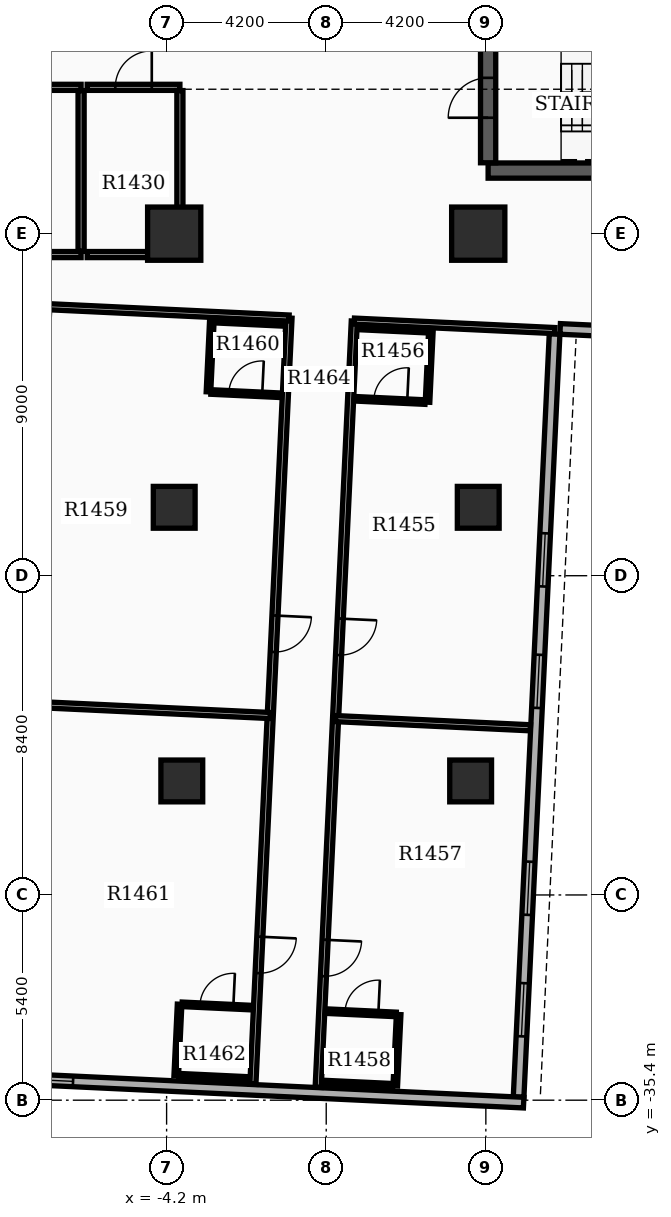
"""IFC4 building model, lengths in metres.
Left out: names, types, materials, properties, quantities, classifications, styles, units other than length and angle.
Written with IfcOpenShell. Run it as: python <this file> out.ifc"""

import sys

from ifc_helpers import new_model, si_unit, direction, frame, frame_2d, origin, origin_2d, place, context, subcontext, project, spatial, rectangle, extrude, element, fill, save


model = new_model("IFC4")
c1 = context("Model", 3, precision=1e-05, world=origin(), true_north=direction((0.0, 1.0)))
c2 = subcontext(c1, "Body", "Model", "MODEL_VIEW")
j1 = project(units=[si_unit("LENGTHUNIT", "METRE"), si_unit("PLANEANGLEUNIT", "RADIAN")], contexts=[c1])
p1 = place(None, origin())
s1 = spatial("IfcSite", under=j1, at=p1, CompositionType="ELEMENT")
p2 = place(p1, origin())
s2 = spatial("IfcBuilding", under=s1, at=p2, CompositionType="ELEMENT")
p3 = place(p2, frame((0.0, 0.0, 91.2)))
s3 = spatial("IfcBuildingStorey", under=s2, at=p3, CompositionType="ELEMENT", Elevation=91.2)
p4 = place(p3, frame((4.26, -10.94, 0.0), z_axis=(0.0, 0.0, 1.0), x_axis=(1.0, 0.0, 0.0)))
e1 = element("IfcWall", 1, at=p4, inside=s3, PredefinedType="SHEAR", context=c2, shape_type="SweptSolid", body=[
    extrude(rectangle(XDim=7.96, YDim=0.4, at=frame_2d((3.98, 0.0))), origin(), (0.0, 0.0, 1.0), 3.65),
])
p5 = place(p3, frame((4.26, -10.735, 0.0), z_axis=(0.0, 0.0, 1.0), x_axis=(0.0, 1.0, 0.0)))
e2 = element("IfcWall", 2, at=p5, inside=s3, PredefinedType="SHEAR", context=c2, shape_type="SweptSolid", body=[
    extrude(rectangle(XDim=3.43, YDim=0.4, at=frame_2d((1.715, 0.0))), origin(), (0.0, 0.0, 1.0), 3.65),
])
p6 = place(p5, frame((1.185, 0.0, 0.0)))
e3 = element("IfcOpeningElement", 3, at=p6, cuts=e2, PredefinedType="OPENING", context=c2, shape_type="SweptSolid", body=[
    extrude(rectangle(XDim=1.05, YDim=2.15, at=frame_2d((0.525, 1.075))), frame((0.0, 0.21, 0.0), z_axis=(0.0, -1.0, 0.0), x_axis=(1.0, 0.0, 0.0)), (0.0, 0.0, 1.0), 0.42),
])
for number, where, z_axis, x_axis in (
    (4, (-4.0, -12.6, 0.0), (0.0, 0.0, 1.0), (1.0, 0.0, 0.0)),
    (5, (4.0, -12.6, 0.0), (0.0, 0.0, 1.0), (1.0, 0.0, 0.0)),
):
    element("IfcColumn", number, at=place(p3, frame(where, z_axis=z_axis, x_axis=x_axis)), inside=s3, PredefinedType="COLUMN", context=c2, shape_type="SweptSolid", body=[
        extrude(rectangle(XDim=1.4, YDim=1.4, at=origin_2d()), origin(), (0.0, 0.0, 1.0), 3.9),
    ])
for number, where, z_axis, x_axis in (
    (6, (-4.0, -19.8, 0.0), (0.0, 0.0, 1.0), (1.0, 0.0, 0.0)),
    (7, (4.0, -19.8, 0.0), (0.0, 0.0, 1.0), (1.0, 0.0, 0.0)),
    (8, (-3.8, -27.0, 0.0), (0.0, 0.0, 1.0), (1.0, 0.0, 0.0)),
    (9, (3.8, -27.0, 0.0), (0.0, 0.0, 1.0), (1.0, 0.0, 0.0)),
):
    element("IfcColumn", number, at=place(p3, frame(where, z_axis=z_axis, x_axis=x_axis)), inside=s3, PredefinedType="COLUMN", context=c2, shape_type="SweptSolid", body=[
        extrude(rectangle(XDim=1.1, YDim=1.1, at=origin_2d()), origin(), (0.0, 0.0, 1.0), 3.9),
    ])
p7 = place(p3, frame((5.062, -35.318, 0.0), z_axis=(0.0, 0.0, 1.0), x_axis=(0.047103473814, 0.998890015344, 0.0)))
e10 = element("IfcWall", 10, at=p7, inside=s3, PredefinedType="STANDARD", context=c2, shape_type="SweptSolid", body=[
    extrude(rectangle(XDim=20.1, YDim=0.28, at=frame_2d((10.05, 0.0))), origin(), (0.0, 0.0, 1.0), 2.86),
])
p8 = place(p7, frame((1.6, 0.0, 0.8)))
e11 = element("IfcOpeningElement", 11, at=p8, cuts=e10, PredefinedType="OPENING", context=c2, shape_type="SweptSolid", body=[
    extrude(rectangle(XDim=1.4, YDim=1.6, at=frame_2d((0.7, 0.8))), frame((0.0, 0.15, 0.0), z_axis=(0.0, -1.0, 0.0), x_axis=(1.0, 0.0, 0.0)), (0.0, 0.0, 1.0), 0.3),
])
p9 = place(p7, frame((4.8, 0.0, 0.8)))
e12 = element("IfcOpeningElement", 12, at=p9, cuts=e10, PredefinedType="OPENING", context=c2, shape_type="SweptSolid", body=[
    extrude(rectangle(XDim=1.4, YDim=1.6, at=frame_2d((0.7, 0.8))), frame((0.0, 0.15, 0.0), z_axis=(0.0, -1.0, 0.0), x_axis=(1.0, 0.0, 0.0)), (0.0, 0.0, 1.0), 0.3),
])
p10 = place(p7, frame((10.25, 0.0, 0.8)))
e13 = element("IfcOpeningElement", 13, at=p10, cuts=e10, PredefinedType="OPENING", context=c2, shape_type="SweptSolid", body=[
    extrude(rectangle(XDim=1.4, YDim=1.6, at=frame_2d((0.7, 0.8))), frame((0.0, 0.15, 0.0), z_axis=(0.0, -1.0, 0.0), x_axis=(1.0, 0.0, 0.0)), (0.0, 0.0, 1.0), 0.3),
])
p11 = place(p7, frame((13.45, 0.0, 0.8)))
e14 = element("IfcOpeningElement", 14, at=p11, cuts=e10, PredefinedType="OPENING", context=c2, shape_type="SweptSolid", body=[
    extrude(rectangle(XDim=1.4, YDim=1.6, at=frame_2d((0.7, 0.8))), frame((0.0, 0.15, 0.0), z_axis=(0.0, -1.0, 0.0), x_axis=(1.0, 0.0, 0.0)), (0.0, 0.0, 1.0), 0.3),
])
p12 = place(p3, frame((-8.51, -34.818, 0.0), z_axis=(0.0, 0.0, 1.0), x_axis=(0.998890092147, -0.047101845086, 0.0)))
e15 = element("IfcWall", 15, at=p12, inside=s3, PredefinedType="STANDARD", context=c2, shape_type="SweptSolid", body=[
    extrude(rectangle(XDim=13.72, YDim=0.28, at=frame_2d((6.86, 0.0))), origin(), (0.0, 0.0, 1.0), 2.86),
])
p13 = place(p12, frame((0.85, 0.0, 0.85)))
e16 = element("IfcOpeningElement", 16, at=p13, cuts=e15, PredefinedType="OPENING", context=c2, shape_type="SweptSolid", body=[
    extrude(rectangle(XDim=1.0, YDim=1.5, at=frame_2d((0.5, 0.75))), frame((0.0, 0.15, 0.0), z_axis=(0.0, -1.0, 0.0), x_axis=(1.0, 0.0, 0.0)), (0.0, 0.0, 1.0), 0.3),
])
p14 = place(p3, frame((12.448, -15.404, 0.0), z_axis=(0.0, 0.0, 1.0), x_axis=(-0.998889082162, 0.047123258997, 0.0)))
e17 = element("IfcWall", 17, at=p14, inside=s3, PredefinedType="STANDARD", context=c2, shape_type="SweptSolid", body=[
    extrude(rectangle(XDim=6.3, YDim=0.28, at=frame_2d((3.15, 0.0))), origin(), (0.0, 0.0, 1.0), 2.86),
])
p15 = place(p3, frame((-12.4, -13.15, 0.0), z_axis=(0.0, 0.0, 1.0), x_axis=(1.0, 0.0, 0.0)))
e18 = element("IfcWall", 18, at=p15, inside=s3, PredefinedType="PARTITIONING", context=c2, shape_type="SweptSolid", body=[
    extrude(rectangle(XDim=5.95, YDim=0.16, at=frame_2d((2.975, 0.0))), origin(), (0.0, 0.0, 1.0), 2.85),
])
p16 = place(p3, frame((-12.4, -8.75, 0.0), z_axis=(0.0, 0.0, 1.0), x_axis=(1.0, 0.0, 0.0)))
e19 = element("IfcWall", 19, at=p16, inside=s3, PredefinedType="PARTITIONING", context=c2, shape_type="SweptSolid", body=[
    extrude(rectangle(XDim=5.95, YDim=0.16, at=frame_2d((2.975, 0.0))), origin(), (0.0, 0.0, 1.0), 2.85),
])
p17 = place(p16, frame((2.495, 0.0, 0.0)))
e20 = element("IfcOpeningElement", 20, at=p17, cuts=e19, PredefinedType="OPENING", context=c2, shape_type="SweptSolid", body=[
    extrude(rectangle(XDim=0.96, YDim=2.15, at=frame_2d((0.48, 1.075))), frame((0.0, 0.09, 0.0), z_axis=(0.0, -1.0, 0.0), x_axis=(1.0, 0.0, 0.0)), (0.0, 0.0, 1.0), 0.18),
])
p18 = place(p3, frame((-6.45, -13.065, 0.0), z_axis=(0.0, 0.0, 1.0), x_axis=(0.0, 1.0, 0.0)))
e21 = element("IfcWall", 21, at=p18, inside=s3, PredefinedType="PARTITIONING", context=c2, shape_type="SweptSolid", body=[
    extrude(rectangle(XDim=4.23, YDim=0.16, at=frame_2d((2.115, 0.0))), origin(), (0.0, 0.0, 1.0), 2.85),
])
p19 = place(p3, frame((-6.29, -13.15, 0.0), z_axis=(0.0, 0.0, 1.0), x_axis=(1.0, 0.0, 0.0)))
e22 = element("IfcWall", 22, at=p19, inside=s3, PredefinedType="PARTITIONING", context=c2, shape_type="SweptSolid", body=[
    extrude(rectangle(XDim=2.44, YDim=0.16, at=frame_2d((1.22, 0.0))), origin(), (0.0, 0.0, 1.0), 2.85),
])
p20 = place(p3, frame((-6.29, -8.75, 0.0), z_axis=(0.0, 0.0, 1.0), x_axis=(1.0, 0.0, 0.0)))
e23 = element("IfcWall", 23, at=p20, inside=s3, PredefinedType="PARTITIONING", context=c2, shape_type="SweptSolid", body=[
    extrude(rectangle(XDim=2.44, YDim=0.16, at=frame_2d((1.22, 0.0))), origin(), (0.0, 0.0, 1.0), 2.85),
])
p21 = place(p20, frame((0.74, 0.0, 0.0)))
e24 = element("IfcOpeningElement", 24, at=p21, cuts=e23, PredefinedType="OPENING", context=c2, shape_type="SweptSolid", body=[
    extrude(rectangle(XDim=0.96, YDim=2.15, at=frame_2d((0.48, 1.075))), frame((0.0, 0.09, 0.0), z_axis=(0.0, -1.0, 0.0), x_axis=(1.0, 0.0, 0.0)), (0.0, 0.0, 1.0), 0.18),
])
p22 = place(p3, frame((-3.85, -13.065, 0.0), z_axis=(0.0, 0.0, 1.0), x_axis=(0.0, 1.0, 0.0)))
e25 = element("IfcWall", 25, at=p22, inside=s3, PredefinedType="PARTITIONING", context=c2, shape_type="SweptSolid", body=[
    extrude(rectangle(XDim=4.23, YDim=0.16, at=frame_2d((2.115, 0.0))), origin(), (0.0, 0.0, 1.0), 2.85),
])
p23 = place(p3, frame((0.739, -14.901, 0.0), z_axis=(0.0, 0.0, 1.0), x_axis=(-0.047117991871, -0.998889330628, 0.0)))
e26 = element("IfcWall", 26, at=p23, inside=s3, PredefinedType="PARTITIONING", context=c2, shape_type="SweptSolid", body=[
    extrude(rectangle(XDim=20.182, YDim=0.16, at=frame_2d((10.091, 0.0))), origin(), (0.0, 0.0, 1.0), 2.85),
])
p24 = place(p23, frame((7.836, 0.0, 0.0)))
e27 = element("IfcOpeningElement", 27, at=p24, cuts=e26, PredefinedType="OPENING", context=c2, shape_type="SweptSolid", body=[
    extrude(rectangle(XDim=0.96, YDim=2.15, at=frame_2d((0.48, 1.075))), frame((0.0, 0.09, 0.0), z_axis=(0.0, -1.0, 0.0), x_axis=(1.0, 0.0, 0.0)), (0.0, 0.0, 1.0), 0.18),
])
p25 = place(p23, frame((16.296, 0.0, 0.0)))
e28 = element("IfcOpeningElement", 28, at=p25, cuts=e26, PredefinedType="OPENING", context=c2, shape_type="SweptSolid", body=[
    extrude(rectangle(XDim=0.96, YDim=2.15, at=frame_2d((0.48, 1.075))), frame((0.0, 0.09, 0.0), z_axis=(0.0, -1.0, 0.0), x_axis=(1.0, 0.0, 0.0)), (0.0, 0.0, 1.0), 0.18),
])
p26 = place(p3, frame((0.739, -14.901, 0.0), z_axis=(0.0, 0.0, 1.0), x_axis=(0.998889275357, -0.047119163577, 0.0)))
e29 = element("IfcWall", 29, at=p26, inside=s3, PredefinedType="PARTITIONING", context=c2, shape_type="SweptSolid", body=[
    extrude(rectangle(XDim=5.28, YDim=0.16, at=frame_2d((2.64, 0.0))), origin(), (0.0, 0.0, 1.0), 2.85),
])
p27 = place(p3, frame((0.246, -25.36, 0.0), z_axis=(0.0, 0.0, 1.0), x_axis=(0.998890413328, -0.047095033298, 0.0)))
e30 = element("IfcWall", 30, at=p27, inside=s3, PredefinedType="PARTITIONING", context=c2, shape_type="SweptSolid", body=[
    extrude(rectangle(XDim=5.132, YDim=0.16, at=frame_2d((2.566, 0.0))), origin(), (0.0, 0.0, 1.0), 2.85),
])
p28 = place(p3, frame((0.783, -16.946, 0.0), z_axis=(0.0, 0.0, 1.0), x_axis=(0.998890786574, -0.047087116047, 0.0)))
e31 = element("IfcWall", 31, at=p28, inside=s3, PredefinedType="PARTITIONING", context=c2, shape_type="SweptSolid", body=[
    extrude(rectangle(XDim=1.82, YDim=0.12, at=frame_2d((0.91, 0.0))), origin(), (0.0, 0.0, 1.0), 2.85),
])
p29 = place(p28, frame((0.47, 0.0, 0.0)))
e32 = element("IfcOpeningElement", 32, at=p29, cuts=e31, PredefinedType="OPENING", context=c2, shape_type="SweptSolid", body=[
    extrude(rectangle(XDim=0.88, YDim=2.1, at=frame_2d((0.44, 1.05))), frame((0.0, 0.07, 0.0), z_axis=(0.0, -1.0, 0.0), x_axis=(1.0, 0.0, 0.0)), (0.0, 0.0, 1.0), 0.14),
])
p30 = place(p3, frame((0.871, -15.068, 0.0), z_axis=(0.0, 0.0, 1.0), x_axis=(0.998891083954, -0.047080807099, 0.0)))
e33 = element("IfcWall", 33, at=p30, inside=s3, PredefinedType="PARTITIONING", context=c2, shape_type="SweptSolid", body=[
    extrude(rectangle(XDim=1.82, YDim=0.12, at=frame_2d((0.91, 0.0))), origin(), (0.0, 0.0, 1.0), 2.85),
])
p31 = place(p3, frame((2.754, -15.156, 0.0), z_axis=(0.0, 0.0, 1.0), x_axis=(-0.047139425368, -0.998888319371, 0.0)))
e34 = element("IfcWall", 34, at=p31, inside=s3, PredefinedType="PARTITIONING", context=c2, shape_type="SweptSolid", body=[
    extrude(rectangle(XDim=1.88, YDim=0.12, at=frame_2d((0.94, 0.0))), origin(), (0.0, 0.0, 1.0), 2.85),
])
p32 = place(p3, frame((0.023, -33.058, 0.0), z_axis=(0.0, 0.0, 1.0), x_axis=(0.998891083954, -0.047080807099, 0.0)))
e35 = element("IfcWall", 35, at=p32, inside=s3, PredefinedType="PARTITIONING", context=c2, shape_type="SweptSolid", body=[
    extrude(rectangle(XDim=1.82, YDim=0.12, at=frame_2d((0.91, 0.0))), origin(), (0.0, 0.0, 1.0), 2.85),
])
p33 = place(p32, frame((0.47, 0.0, 0.0)))
e36 = element("IfcOpeningElement", 36, at=p33, cuts=e35, PredefinedType="OPENING", context=c2, shape_type="SweptSolid", body=[
    extrude(rectangle(XDim=0.88, YDim=2.1, at=frame_2d((0.44, 1.05))), frame((0.0, 0.07, 0.0), z_axis=(0.0, -1.0, 0.0), x_axis=(1.0, 0.0, 0.0)), (0.0, 0.0, 1.0), 0.14),
])
p34 = place(p3, frame((-0.066, -34.936, 0.0), z_axis=(0.0, 0.0, 1.0), x_axis=(0.998891083954, -0.047080807099, 0.0)))
e37 = element("IfcWall", 37, at=p34, inside=s3, PredefinedType="PARTITIONING", context=c2, shape_type="SweptSolid", body=[
    extrude(rectangle(XDim=1.82, YDim=0.12, at=frame_2d((0.91, 0.0))), origin(), (0.0, 0.0, 1.0), 2.85),
])
p35 = place(p3, frame((1.906, -33.146, 0.0), z_axis=(0.0, 0.0, 1.0), x_axis=(-0.047139425368, -0.998888319371, 0.0)))
e38 = element("IfcWall", 38, at=p35, inside=s3, PredefinedType="PARTITIONING", context=c2, shape_type="SweptSolid", body=[
    extrude(rectangle(XDim=1.88, YDim=0.12, at=frame_2d((0.94, 0.0))), origin(), (0.0, 0.0, 1.0), 2.85),
])
p36 = place(p3, frame((-0.979, -14.82, 0.0), z_axis=(0.0, 0.0, 1.0), x_axis=(-0.047105352469, -0.998889926753, 0.0)))
e39 = element("IfcWall", 39, at=p36, inside=s3, PredefinedType="PARTITIONING", context=c2, shape_type="SweptSolid", body=[
    extrude(rectangle(XDim=20.182, YDim=0.16, at=frame_2d((10.091, 0.0))), origin(), (0.0, 0.0, 1.0), 2.85),
])
p37 = place(p36, frame((7.836, 0.0, 0.0)))
e40 = element("IfcOpeningElement", 40, at=p37, cuts=e39, PredefinedType="OPENING", context=c2, shape_type="SweptSolid", body=[
    extrude(rectangle(XDim=0.96, YDim=2.15, at=frame_2d((0.48, 1.075))), frame((0.0, 0.09, 0.0), z_axis=(0.0, -1.0, 0.0), x_axis=(1.0, 0.0, 0.0)), (0.0, 0.0, 1.0), 0.18),
])
p38 = place(p36, frame((16.296, 0.0, 0.0)))
e41 = element("IfcOpeningElement", 41, at=p38, cuts=e39, PredefinedType="OPENING", context=c2, shape_type="SweptSolid", body=[
    extrude(rectangle(XDim=0.96, YDim=2.15, at=frame_2d((0.48, 1.075))), frame((0.0, 0.09, 0.0), z_axis=(0.0, -1.0, 0.0), x_axis=(1.0, 0.0, 0.0)), (0.0, 0.0, 1.0), 0.18),
])
p39 = place(p3, frame((-0.979, -14.82, 0.0), z_axis=(0.0, 0.0, 1.0), x_axis=(-0.998890922349, 0.047084235666, 0.0)))
e42 = element("IfcWall", 42, at=p39, inside=s3, PredefinedType="PARTITIONING", context=c2, shape_type="SweptSolid", body=[
    extrude(rectangle(XDim=6.44, YDim=0.16, at=frame_2d((3.22, 0.0))), origin(), (0.0, 0.0, 1.0), 2.85),
])
p40 = place(p3, frame((-1.472, -25.279, 0.0), z_axis=(0.0, 0.0, 1.0), x_axis=(-0.998889891508, 0.047106099844, 0.0)))
e43 = element("IfcWall", 43, at=p40, inside=s3, PredefinedType="PARTITIONING", context=c2, shape_type="SweptSolid", body=[
    extrude(rectangle(XDim=6.292, YDim=0.16, at=frame_2d((3.146, 0.0))), origin(), (0.0, 0.0, 1.0), 2.85),
])
p41 = place(p3, frame((-3.033, -16.766, 0.0), z_axis=(0.0, 0.0, 1.0), x_axis=(0.998884766924, -0.047214641863, 0.0)))
e44 = element("IfcWall", 44, at=p41, inside=s3, PredefinedType="PARTITIONING", context=c2, shape_type="SweptSolid", body=[
    extrude(rectangle(XDim=1.82, YDim=0.12, at=frame_2d((0.91, 0.0))), origin(), (0.0, 0.0, 1.0), 2.85),
])
p42 = place(p41, frame((0.47, 0.0, 0.0)))
e45 = element("IfcOpeningElement", 45, at=p42, cuts=e44, PredefinedType="OPENING", context=c2, shape_type="SweptSolid", body=[
    extrude(rectangle(XDim=0.88, YDim=2.1, at=frame_2d((0.44, 1.05))), frame((0.0, 0.07, 0.0), z_axis=(0.0, -1.0, 0.0), x_axis=(1.0, 0.0, 0.0)), (0.0, 0.0, 1.0), 0.14),
])
p43 = place(p3, frame((-2.945, -14.888, 0.0), z_axis=(0.0, 0.0, 1.0), x_axis=(0.998884467853, -0.047220968666, 0.0)))
e46 = element("IfcWall", 46, at=p43, inside=s3, PredefinedType="PARTITIONING", context=c2, shape_type="SweptSolid", body=[
    extrude(rectangle(XDim=1.82, YDim=0.12, at=frame_2d((0.91, 0.0))), origin(), (0.0, 0.0, 1.0), 2.85),
])
p44 = place(p3, frame((-3.01, -14.885, 0.0), z_axis=(0.0, 0.0, 1.0), x_axis=(-0.047139425368, -0.998888319371, 0.0)))
e47 = element("IfcWall", 47, at=p44, inside=s3, PredefinedType="PARTITIONING", context=c2, shape_type="SweptSolid", body=[
    extrude(rectangle(XDim=1.88, YDim=0.12, at=frame_2d((0.94, 0.0))), origin(), (0.0, 0.0, 1.0), 2.85),
])
p45 = place(p3, frame((-3.793, -32.878, 0.0), z_axis=(0.0, 0.0, 1.0), x_axis=(0.998884467853, -0.047220968666, 0.0)))
e48 = element("IfcWall", 48, at=p45, inside=s3, PredefinedType="PARTITIONING", context=c2, shape_type="SweptSolid", body=[
    extrude(rectangle(XDim=1.82, YDim=0.12, at=frame_2d((0.91, 0.0))), origin(), (0.0, 0.0, 1.0), 2.85),
])
p46 = place(p45, frame((0.47, 0.0, 0.0)))
e49 = element("IfcOpeningElement", 49, at=p46, cuts=e48, PredefinedType="OPENING", context=c2, shape_type="SweptSolid", body=[
    extrude(rectangle(XDim=0.88, YDim=2.1, at=frame_2d((0.44, 1.05))), frame((0.0, 0.07, 0.0), z_axis=(0.0, -1.0, 0.0), x_axis=(1.0, 0.0, 0.0)), (0.0, 0.0, 1.0), 0.14),
])
p47 = place(p3, frame((-3.882, -34.756, 0.0), z_axis=(0.0, 0.0, 1.0), x_axis=(0.998884766924, -0.047214641863, 0.0)))
e50 = element("IfcWall", 50, at=p47, inside=s3, PredefinedType="PARTITIONING", context=c2, shape_type="SweptSolid", body=[
    extrude(rectangle(XDim=1.82, YDim=0.12, at=frame_2d((0.91, 0.0))), origin(), (0.0, 0.0, 1.0), 2.85),
])
p48 = place(p3, frame((-3.858, -32.875, 0.0), z_axis=(0.0, 0.0, 1.0), x_axis=(-0.047139425368, -0.998888319371, 0.0)))
e51 = element("IfcWall", 51, at=p48, inside=s3, PredefinedType="PARTITIONING", context=c2, shape_type="SweptSolid", body=[
    extrude(rectangle(XDim=1.88, YDim=0.12, at=frame_2d((0.94, 0.0))), origin(), (0.0, 0.0, 1.0), 2.85),
])
p49 = place(p8, origin())
e52 = element("IfcWindow", 52, at=p49, inside=s3, PartitioningType="SINGLE_PANEL", PredefinedType="WINDOW", context=c2, shape_type="SweptSolid", body=[
    extrude(rectangle(XDim=1.4, YDim=1.6, at=frame_2d((0.7, 0.8))), frame((0.0, 0.03, 0.0), z_axis=(0.0, -1.0, 0.0), x_axis=(1.0, 0.0, 0.0)), (0.0, 0.0, 1.0), 0.06),
])
fill(e11, e52)
p50 = place(p9, origin())
e53 = element("IfcWindow", 53, at=p50, inside=s3, PartitioningType="SINGLE_PANEL", PredefinedType="WINDOW", context=c2, shape_type="SweptSolid", body=[
    extrude(rectangle(XDim=1.4, YDim=1.6, at=frame_2d((0.7, 0.8))), frame((0.0, 0.03, 0.0), z_axis=(0.0, -1.0, 0.0), x_axis=(1.0, 0.0, 0.0)), (0.0, 0.0, 1.0), 0.06),
])
fill(e12, e53)
p51 = place(p10, origin())
e54 = element("IfcWindow", 54, at=p51, inside=s3, PartitioningType="SINGLE_PANEL", PredefinedType="WINDOW", context=c2, shape_type="SweptSolid", body=[
    extrude(rectangle(XDim=1.4, YDim=1.6, at=frame_2d((0.7, 0.8))), frame((0.0, 0.03, 0.0), z_axis=(0.0, -1.0, 0.0), x_axis=(1.0, 0.0, 0.0)), (0.0, 0.0, 1.0), 0.06),
])
fill(e13, e54)
p52 = place(p11, origin())
e55 = element("IfcWindow", 55, at=p52, inside=s3, PartitioningType="SINGLE_PANEL", PredefinedType="WINDOW", context=c2, shape_type="SweptSolid", body=[
    extrude(rectangle(XDim=1.4, YDim=1.6, at=frame_2d((0.7, 0.8))), frame((0.0, 0.03, 0.0), z_axis=(0.0, -1.0, 0.0), x_axis=(1.0, 0.0, 0.0)), (0.0, 0.0, 1.0), 0.06),
])
fill(e14, e55)
p53 = place(p13, origin())
e56 = element("IfcWindow", 56, at=p53, inside=s3, PartitioningType="SINGLE_PANEL", PredefinedType="WINDOW", context=c2, shape_type="SweptSolid", body=[
    extrude(rectangle(XDim=1.0, YDim=1.5, at=frame_2d((0.5, 0.75))), frame((0.0, 0.03, 0.0), z_axis=(0.0, -1.0, 0.0), x_axis=(1.0, 0.0, 0.0)), (0.0, 0.0, 1.0), 0.06),
])
fill(e16, e56)
p54 = place(p6, origin())
e57 = element("IfcDoor", 57, at=p54, inside=s3, OperationType="SINGLE_SWING_LEFT", PredefinedType="DOOR", context=c2, shape_type="SweptSolid", body=[
    extrude(rectangle(XDim=1.05, YDim=2.15, at=frame_2d((0.525, 1.075))), frame((0.0, 0.025, 0.0), z_axis=(0.0, -1.0, 0.0), x_axis=(1.0, 0.0, 0.0)), (0.0, 0.0, 1.0), 0.05),
])
fill(e3, e57)
p55 = place(p21, origin())
e58 = element("IfcDoor", 58, at=p55, inside=s3, OperationType="SINGLE_SWING_RIGHT", PredefinedType="DOOR", context=c2, shape_type="SweptSolid", body=[
    extrude(rectangle(XDim=0.96, YDim=2.15, at=frame_2d((0.48, 1.075))), frame((0.0, 0.025, 0.0), z_axis=(0.0, -1.0, 0.0), x_axis=(1.0, 0.0, 0.0)), (0.0, 0.0, 1.0), 0.05),
])
fill(e24, e58)
p56 = place(p24, origin())
e59 = element("IfcDoor", 59, at=p56, inside=s3, OperationType="SINGLE_SWING_LEFT", PredefinedType="DOOR", context=c2, shape_type="SweptSolid", body=[
    extrude(rectangle(XDim=0.96, YDim=2.15, at=frame_2d((0.48, 1.075))), frame((0.0, 0.025, 0.0), z_axis=(0.0, -1.0, 0.0), x_axis=(1.0, 0.0, 0.0)), (0.0, 0.0, 1.0), 0.05),
])
fill(e27, e59)
p57 = place(p29, origin())
e60 = element("IfcDoor", 60, at=p57, inside=s3, OperationType="SINGLE_SWING_RIGHT", PredefinedType="DOOR", context=c2, shape_type="SweptSolid", body=[
    extrude(rectangle(XDim=0.88, YDim=2.1, at=frame_2d((0.44, 1.05))), frame((0.0, 0.025, 0.0), z_axis=(0.0, -1.0, 0.0), x_axis=(1.0, 0.0, 0.0)), (0.0, 0.0, 1.0), 0.05),
])
fill(e32, e60)
p58 = place(p25, origin())
e61 = element("IfcDoor", 61, at=p58, inside=s3, OperationType="SINGLE_SWING_LEFT", PredefinedType="DOOR", context=c2, shape_type="SweptSolid", body=[
    extrude(rectangle(XDim=0.96, YDim=2.15, at=frame_2d((0.48, 1.075))), frame((0.0, 0.025, 0.0), z_axis=(0.0, -1.0, 0.0), x_axis=(1.0, 0.0, 0.0)), (0.0, 0.0, 1.0), 0.05),
])
fill(e28, e61)
p59 = place(p33, origin())
e62 = element("IfcDoor", 62, at=p59, inside=s3, OperationType="SINGLE_SWING_RIGHT", PredefinedType="DOOR", context=c2, shape_type="SweptSolid", body=[
    extrude(rectangle(XDim=0.88, YDim=2.1, at=frame_2d((0.44, 1.05))), frame((0.0, 0.025, 0.0), z_axis=(0.0, -1.0, 0.0), x_axis=(1.0, 0.0, 0.0)), (0.0, 0.0, 1.0), 0.05),
])
fill(e36, e62)
p60 = place(p37, origin())
e63 = element("IfcDoor", 63, at=p60, inside=s3, OperationType="SINGLE_SWING_LEFT", PredefinedType="DOOR", context=c2, shape_type="SweptSolid", body=[
    extrude(rectangle(XDim=0.96, YDim=2.15, at=frame_2d((0.48, 1.075))), frame((0.0, 0.025, 0.0), z_axis=(0.0, -1.0, 0.0), x_axis=(1.0, 0.0, 0.0)), (0.0, 0.0, 1.0), 0.05),
])
fill(e40, e63)
p61 = place(p42, origin())
e64 = element("IfcDoor", 64, at=p61, inside=s3, OperationType="SINGLE_SWING_RIGHT", PredefinedType="DOOR", context=c2, shape_type="SweptSolid", body=[
    extrude(rectangle(XDim=0.88, YDim=2.1, at=frame_2d((0.44, 1.05))), frame((0.0, 0.025, 0.0), z_axis=(0.0, -1.0, 0.0), x_axis=(1.0, 0.0, 0.0)), (0.0, 0.0, 1.0), 0.05),
])
fill(e45, e64)
p62 = place(p38, origin())
e65 = element("IfcDoor", 65, at=p62, inside=s3, OperationType="SINGLE_SWING_LEFT", PredefinedType="DOOR", context=c2, shape_type="SweptSolid", body=[
    extrude(rectangle(XDim=0.96, YDim=2.15, at=frame_2d((0.48, 1.075))), frame((0.0, 0.025, 0.0), z_axis=(0.0, -1.0, 0.0), x_axis=(1.0, 0.0, 0.0)), (0.0, 0.0, 1.0), 0.05),
])
fill(e41, e65)
p63 = place(p46, origin())
e66 = element("IfcDoor", 66, at=p63, inside=s3, OperationType="SINGLE_SWING_RIGHT", PredefinedType="DOOR", context=c2, shape_type="SweptSolid", body=[
    extrude(rectangle(XDim=0.88, YDim=2.1, at=frame_2d((0.44, 1.05))), frame((0.0, 0.025, 0.0), z_axis=(0.0, -1.0, 0.0), x_axis=(1.0, 0.0, 0.0)), (0.0, 0.0, 1.0), 0.05),
])
fill(e49, e66)
save(model, sys.argv[1])
